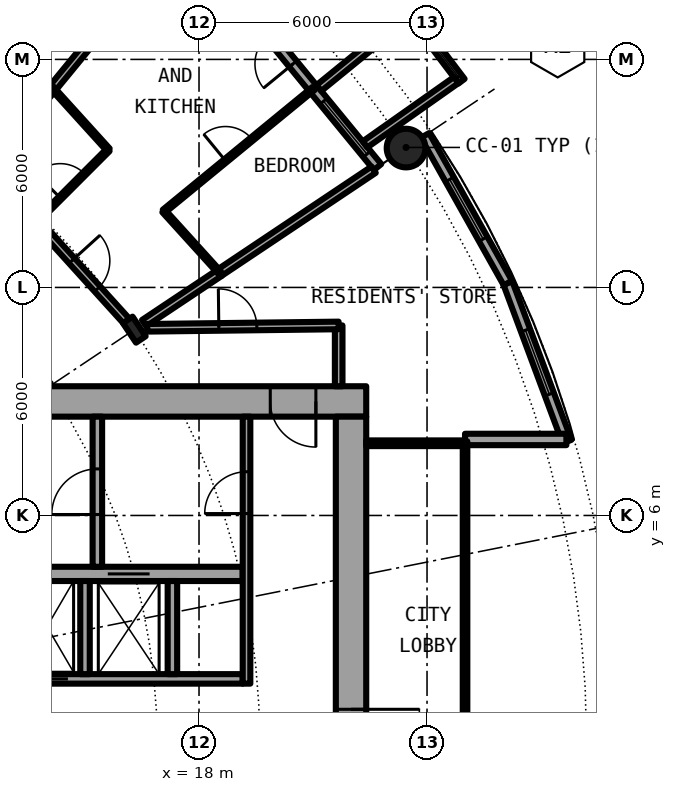
"""IFC4 building model, lengths in metres.
Left out: names, types, materials, properties, quantities, classifications, styles, units other than length and angle.
Written with IfcOpenShell. Run it as: python <this file> out.ifc"""

import sys

from ifc_helpers import new_model, si_unit, direction, frame, frame_2d, origin, origin_2d, place, context, subcontext, project, spatial, rectangle, circle, hollow_circle, i_section, extrude, element, fill, save


model = new_model("IFC4")
c1 = context("Model", 3, precision=1e-05, world=origin(), true_north=direction((0.0, 1.0)))
c2 = subcontext(c1, "Body", "Model", "MODEL_VIEW")
j1 = project(units=[si_unit("LENGTHUNIT", "METRE"), si_unit("PLANEANGLEUNIT", "RADIAN")], contexts=[c1])
p1 = place(None, origin())
s1 = spatial("IfcSite", under=j1, at=p1, CompositionType="ELEMENT")
p2 = place(p1, origin())
s2 = spatial("IfcBuilding", under=s1, at=p2, CompositionType="ELEMENT")
p3 = place(p2, frame((0.0, 0.0, 41.1)))
s3 = spatial("IfcBuildingStorey", under=s2, at=p3, CompositionType="ELEMENT", Elevation=41.1)
p4 = place(p3, frame((23.448, 15.667, 0.0), z_axis=(0.0, 0.0, 1.0), x_axis=(1.0, 0.0, 0.0)))
e1 = element("IfcColumn", 1, at=p4, inside=s3, PredefinedType="COLUMN", context=c2, shape_type="SweptSolid", body=[
    extrude(hollow_circle(Radius=0.508, WallThickness=0.05, at=origin_2d()), origin(), (0.0, 0.0, 1.0), 3.05),
])
p5 = place(p3, frame((16.297, 10.889, 0.0), z_axis=(0.0, 0.0, 1.0), x_axis=(0.831469612303, 0.55557023302, 0.0)))
e2 = element("IfcColumn", 2, at=p5, inside=s3, PredefinedType="COLUMN", context=c2, shape_type="SweptSolid", body=[
    extrude(i_section(OverallWidth=0.305, OverallDepth=0.62, WebThickness=0.021, FlangeThickness=0.04, FilletRadius=0.027, at=origin_2d()), origin(), (0.0, 0.0, 1.0), 3.05),
])
p6 = place(p3, frame((22.699, 15.167, 0.0), z_axis=(0.0, 0.0, 1.0), x_axis=(-0.634382322723, 0.773019449054, 0.0)))
e3 = element("IfcWall", 3, at=p6, inside=s3, PredefinedType="SOLIDWALL", context=c2, shape_type="SweptSolid", body=[
    extrude(rectangle(XDim=5.352, YDim=0.25, at=frame_2d((2.676, 0.0))), origin(), (0.0, 0.0, 1.0), 2.7),
])
p7 = place(p6, frame((0.441, 0.0, 0.3)))
e4 = element("IfcOpeningElement", 4, at=p7, cuts=e3, PredefinedType="OPENING", context=c2, shape_type="SweptSolid", body=[
    extrude(rectangle(XDim=1.8, YDim=2.1, at=frame_2d((0.9, 1.05))), frame((0.0, 0.135, 0.0), z_axis=(0.0, -1.0, 0.0), x_axis=(1.0, 0.0, 0.0)), (0.0, 0.0, 1.0), 0.27),
])
p8 = place(p6, frame((3.51, 0.0, 0.0)))
e5 = element("IfcOpeningElement", 5, at=p8, cuts=e3, PredefinedType="OPENING", context=c2, shape_type="SweptSolid", body=[
    extrude(rectangle(XDim=1.0, YDim=2.2, at=frame_2d((0.5, 1.1))), frame((0.0, 0.135, 0.0), z_axis=(0.0, -1.0, 0.0), x_axis=(1.0, 0.0, 0.0)), (0.0, 0.0, 1.0), 0.27),
])
p9 = place(p3, frame((24.909, 17.427, -0.03), z_axis=(0.0, 0.0, 1.0), x_axis=(-0.60418752353, 0.796842165306, 0.0)))
e6 = element("IfcWall", 6, at=p9, inside=s3, PredefinedType="SOLIDWALL", context=c2, shape_type="SweptSolid", body=[
    extrude(rectangle(XDim=2.337, YDim=0.2, at=frame_2d((1.168, 0.0))), origin(), (0.0, 0.0, 1.0), 2.73),
])
p10 = place(p9, frame((0.128, 0.0, 0.33)))
e7 = element("IfcOpeningElement", 7, at=p10, cuts=e6, PredefinedType="OPENING", context=c2, shape_type="SweptSolid", body=[
    extrude(circle(Radius=1.04, at=frame_2d((1.04, 1.04))), frame((0.0, 0.11, 0.0), z_axis=(0.0, -1.0, 0.0), x_axis=(1.0, 0.0, 0.0)), (0.0, 0.0, 1.0), 0.22),
])
p11 = place(p3, frame((22.37, 15.765, -0.03), z_axis=(0.0, 0.0, 1.0), x_axis=(0.817256123454, 0.576274612209, 0.0)))
e8 = element("IfcWall", 8, at=p11, inside=s3, PredefinedType="SOLIDWALL", context=c2, shape_type="SweptSolid", body=[
    extrude(rectangle(XDim=2.933, YDim=0.2, at=frame_2d((1.466, 0.0))), origin(), (0.0, 0.0, 1.0), 2.73),
])
p12 = place(p3, frame((21.155, 17.246, -0.03), z_axis=(0.0, 0.0, 1.0), x_axis=(0.775179004516, 0.631741648902, 0.0)))
e9 = element("IfcWall", 9, at=p12, inside=s3, PredefinedType="SOLIDWALL", context=c2, shape_type="SweptSolid", body=[
    extrude(rectangle(XDim=3.006, YDim=0.2, at=frame_2d((1.503, 0.0))), origin(), (0.0, 0.0, 1.0), 2.73),
])
p13 = place(p3, frame((27.682, 7.945, 0.0), z_axis=(0.0, 0.0, 1.0), x_axis=(-0.349247811493, 0.937030397675, 0.0)))
e10 = element("IfcWall", 10, at=p13, inside=s3, PredefinedType="SOLIDWALL", context=c2, shape_type="SweptSolid", body=[
    extrude(rectangle(XDim=4.452, YDim=0.25, at=frame_2d((2.226, 0.0))), origin(), (0.0, 0.0, 1.0), 2.7),
])
p14 = place(p13, frame((1.327, 0.0, 0.3)))
e11 = element("IfcOpeningElement", 11, at=p14, cuts=e10, PredefinedType="OPENING", context=c2, shape_type="SweptSolid", body=[
    extrude(rectangle(XDim=1.8, YDim=2.1, at=frame_2d((0.9, 1.05))), frame((0.0, 0.135, 0.0), z_axis=(0.0, -1.0, 0.0), x_axis=(1.0, 0.0, 0.0)), (0.0, 0.0, 1.0), 0.27),
])
p15 = place(p3, frame((26.127, 12.117, 0.0), z_axis=(0.0, 0.0, 1.0), x_axis=(-0.489696356642, 0.871893042919, 0.0)))
e12 = element("IfcWall", 12, at=p15, inside=s3, PredefinedType="SOLIDWALL", context=c2, shape_type="SweptSolid", body=[
    extrude(rectangle(XDim=4.454, YDim=0.25, at=frame_2d((2.227, 0.0))), origin(), (0.0, 0.0, 1.0), 2.7),
])
p16 = place(p15, frame((1.327, 0.0, 0.3)))
e13 = element("IfcOpeningElement", 13, at=p16, cuts=e12, PredefinedType="OPENING", context=c2, shape_type="SweptSolid", body=[
    extrude(rectangle(XDim=1.8, YDim=2.1, at=frame_2d((0.9, 1.05))), frame((0.0, 0.135, 0.0), z_axis=(0.0, -1.0, 0.0), x_axis=(1.0, 0.0, 0.0)), (0.0, 0.0, 1.0), 0.27),
])
p17 = place(p3, frame((25.0, 8.0, 0.0), z_axis=(0.0, 0.0, 1.0), x_axis=(1.0, 0.0, 0.0)))
e14 = element("IfcWall", 14, at=p17, inside=s3, PredefinedType="SOLIDWALL", context=c2, shape_type="SweptSolid", body=[
    extrude(rectangle(XDim=2.667, YDim=0.3, at=frame_2d((1.333, 0.0))), origin(), (0.0, 0.0, 1.0), 2.7),
])
p18 = place(p3, frame((22.4, 9.0, 0.0), z_axis=(0.0, 0.0, 1.0), x_axis=(-1.0, 0.0, 0.0)))
e15 = element("IfcWall", 15, at=p18, inside=s3, PredefinedType="SHEAR", context=c2, shape_type="SweptSolid", body=[
    extrude(rectangle(XDim=14.2, YDim=0.8, at=frame_2d((7.1, 0.0))), origin(), (0.0, 0.0, 1.0), 3.05),
])
p19 = place(p18, frame((1.325, 0.0, 0.0)))
e16 = element("IfcOpeningElement", 16, at=p19, cuts=e15, PredefinedType="OPENING", context=c2, shape_type="SweptSolid", body=[
    extrude(rectangle(XDim=1.2, YDim=2.3, at=frame_2d((0.6, 1.15))), frame((0.0, 0.41, 0.0), z_axis=(0.0, -1.0, 0.0), x_axis=(1.0, 0.0, 0.0)), (0.0, 0.0, 1.0), 0.82),
])
p20 = place(p3, frame((22.0, 8.6, 0.0), z_axis=(0.0, 0.0, 1.0), x_axis=(0.0, -1.0, 0.0)))
e17 = element("IfcWall", 17, at=p20, inside=s3, PredefinedType="SHEAR", context=c2, shape_type="SweptSolid", body=[
    extrude(rectangle(XDim=17.2, YDim=0.8, at=frame_2d((8.6, 0.0))), origin(), (0.0, 0.0, 1.0), 3.05),
])
p21 = place(p20, frame((7.7, 0.0, 0.0)))
e18 = element("IfcOpeningElement", 18, at=p21, cuts=e17, PredefinedType="OPENING", context=c2, shape_type="SweptSolid", body=[
    extrude(rectangle(XDim=1.8, YDim=2.3, at=frame_2d((0.9, 1.15))), frame((0.0, 0.41, 0.0), z_axis=(0.0, -1.0, 0.0), x_axis=(1.0, 0.0, 0.0)), (0.0, 0.0, 1.0), 0.82),
])
p22 = place(p3, frame((9.0, 1.7, 0.0), z_axis=(0.0, 0.0, 1.0), x_axis=(1.0, 0.0, 0.0)))
e19 = element("IfcWall", 19, at=p22, inside=s3, PredefinedType="SHEAR", context=c2, shape_type="SweptSolid", body=[
    extrude(rectangle(XDim=10.15, YDim=0.25, at=frame_2d((5.075, 0.0))), origin(), (0.0, 0.0, 1.0), 3.05),
])
p23 = place(p22, frame((0.387, 0.0, 0.0)))
e20 = element("IfcOpeningElement", 20, at=p23, cuts=e19, PredefinedType="OPENING", context=c2, shape_type="SweptSolid", body=[
    extrude(rectangle(XDim=1.1, YDim=2.3, at=frame_2d((0.55, 1.15))), frame((0.0, 0.135, 0.0), z_axis=(0.0, -1.0, 0.0), x_axis=(1.0, 0.0, 0.0)), (0.0, 0.0, 1.0), 0.27),
])
p24 = place(p22, frame((2.45, 0.0, 0.0)))
e21 = element("IfcOpeningElement", 21, at=p24, cuts=e19, PredefinedType="OPENING", context=c2, shape_type="SweptSolid", body=[
    extrude(rectangle(XDim=1.1, YDim=2.3, at=frame_2d((0.55, 1.15))), frame((0.0, 0.135, 0.0), z_axis=(0.0, -1.0, 0.0), x_axis=(1.0, 0.0, 0.0)), (0.0, 0.0, 1.0), 0.27),
])
p25 = place(p22, frame((4.45, 0.0, 0.0)))
e22 = element("IfcOpeningElement", 22, at=p25, cuts=e19, PredefinedType="OPENING", context=c2, shape_type="SweptSolid", body=[
    extrude(rectangle(XDim=1.1, YDim=2.3, at=frame_2d((0.55, 1.15))), frame((0.0, 0.135, 0.0), z_axis=(0.0, -1.0, 0.0), x_axis=(1.0, 0.0, 0.0)), (0.0, 0.0, 1.0), 0.27),
])
p26 = place(p3, frame((9.0, 4.462, 0.0), z_axis=(0.0, 0.0, 1.0), x_axis=(1.0, 0.0, 0.0)))
e23 = element("IfcWall", 23, at=p26, inside=s3, PredefinedType="SHEAR", context=c2, shape_type="SweptSolid", body=[
    extrude(rectangle(XDim=10.15, YDim=0.375, at=frame_2d((5.075, 0.0))), origin(), (0.0, 0.0, 1.0), 3.05),
])
p27 = place(p26, frame((6.6, 0.0, 0.0)))
e24 = element("IfcOpeningElement", 24, at=p27, cuts=e23, PredefinedType="OPENING", context=c2, shape_type="SweptSolid", body=[
    extrude(rectangle(XDim=1.1, YDim=2.3, at=frame_2d((0.55, 1.15))), frame((0.0, 0.198, 0.0), z_axis=(0.0, -1.0, 0.0), x_axis=(1.0, 0.0, 0.0)), (0.0, 0.0, 1.0), 0.395),
])
p28 = place(p3, frame((15.325, 4.65, 0.0), z_axis=(0.0, 0.0, 1.0), x_axis=(0.0, 1.0, 0.0)))
e25 = element("IfcWall", 25, at=p28, inside=s3, PredefinedType="SHEAR", context=c2, shape_type="SweptSolid", body=[
    extrude(rectangle(XDim=3.95, YDim=0.25, at=frame_2d((1.975, 0.0))), origin(), (0.0, 0.0, 1.0), 3.05),
])
p29 = place(p28, frame((1.375, 0.0, 0.0)))
e26 = element("IfcOpeningElement", 26, at=p29, cuts=e25, PredefinedType="OPENING", context=c2, shape_type="SweptSolid", body=[
    extrude(rectangle(XDim=1.2, YDim=2.3, at=frame_2d((0.6, 1.15))), frame((0.0, 0.135, 0.0), z_axis=(0.0, -1.0, 0.0), x_axis=(1.0, 0.0, 0.0)), (0.0, 0.0, 1.0), 0.27),
])
for number, where, z_axis, x_axis in (
    (27, (15.0, 1.825, 0.0), (0.0, 0.0, 1.0), (0.0, 1.0, 0.0)),
    (28, (17.3, 1.825, 0.0), (0.0, 0.0, 1.0), (0.0, 1.0, 0.0)),
):
    element("IfcWall", number, at=place(p3, frame(where, z_axis=z_axis, x_axis=x_axis)), inside=s3, PredefinedType="SOLIDWALL", context=c2, shape_type="SweptSolid", body=[
        extrude(rectangle(XDim=2.45, YDim=0.25, at=frame_2d((1.225, 0.0))), origin(), (0.0, 0.0, 1.0), 2.7),
    ])
p30 = place(p3, frame((19.25, 1.575, 0.0), z_axis=(0.0, 0.0, 1.0), x_axis=(0.0, 1.0, 0.0)))
e29 = element("IfcWall", 29, at=p30, inside=s3, PredefinedType="SOLIDWALL", context=c2, shape_type="SweptSolid", body=[
    extrude(rectangle(XDim=7.025, YDim=0.2, at=frame_2d((3.513, 0.0))), origin(), (0.0, 0.0, 1.0), 2.7),
])
p31 = place(p30, frame((4.475, 0.0, 0.0)))
e30 = element("IfcOpeningElement", 30, at=p31, cuts=e29, PredefinedType="OPENING", context=c2, shape_type="SweptSolid", body=[
    extrude(rectangle(XDim=1.1, YDim=2.3, at=frame_2d((0.55, 1.15))), frame((0.0, 0.11, 0.0), z_axis=(0.0, -1.0, 0.0), x_axis=(1.0, 0.0, 0.0)), (0.0, 0.0, 1.0), 0.22),
])
p32 = place(p3, frame((22.4, 7.9, 0.0), z_axis=(0.0, 0.0, 1.0), x_axis=(1.0, 0.0, 0.0)))
e31 = element("IfcWall", 31, at=p32, inside=s3, PredefinedType="PARTITIONING", context=c2, shape_type="SweptSolid", body=[
    extrude(rectangle(XDim=2.54, YDim=0.15, at=frame_2d((1.27, 0.0))), origin(), (0.0, 0.0, 1.0), 2.7),
])
p33 = place(p3, frame((25.0, -7.95, 0.0), z_axis=(0.0, 0.0, 1.0), x_axis=(0.0, 1.0, 0.0)))
e32 = element("IfcWall", 32, at=p33, inside=s3, PredefinedType="PARTITIONING", context=c2, shape_type="SweptSolid", body=[
    extrude(rectangle(XDim=15.9, YDim=0.12, at=frame_2d((7.95, 0.0))), origin(), (0.0, 0.0, 1.0), 2.7),
])
p34 = place(p33, frame((0.95, 0.0, 0.1)))
e33 = element("IfcOpeningElement", 33, at=p34, cuts=e32, PredefinedType="OPENING", context=c2, shape_type="SweptSolid", body=[
    extrude(rectangle(XDim=14.0, YDim=2.35, at=frame_2d((7.0, 1.175))), frame((0.0, 0.07, 0.0), z_axis=(0.0, -1.0, 0.0), x_axis=(1.0, 0.0, 0.0)), (0.0, 0.0, 1.0), 0.14),
])
p35 = place(p3, frame((21.675, 9.4, 0.0), z_axis=(0.0, 0.0, 1.0), x_axis=(0.0, 1.0, 0.0)))
e34 = element("IfcWall", 34, at=p35, inside=s3, PredefinedType="PARTITIONING", context=c2, shape_type="SweptSolid", body=[
    extrude(rectangle(XDim=1.6, YDim=0.2, at=frame_2d((0.8, 0.0))), origin(), (0.0, 0.0, 1.0), 2.7),
])
p36 = place(p3, frame((12.432, 15.152, 0.0), z_axis=(0.0, 0.0, 1.0), x_axis=(0.634353152115, 0.77304338714, 0.0)))
e35 = element("IfcWall", 35, at=p36, inside=s3, PredefinedType="PARTITIONING", context=c2, shape_type="SweptSolid", body=[
    extrude(rectangle(XDim=7.576, YDim=0.2, at=frame_2d((3.788, 0.0))), origin(), (0.0, 0.0, 1.0), 2.7),
])
p37 = place(p3, frame((13.722, 13.73, 0.0), z_axis=(0.0, 0.0, 1.0), x_axis=(0.706741540154, 0.707471833659, 0.0)))
e36 = element("IfcWall", 36, at=p37, inside=s3, PredefinedType="PARTITIONING", context=c2, shape_type="SweptSolid", body=[
    extrude(rectangle(XDim=2.674, YDim=0.1, at=frame_2d((1.337, 0.0))), origin(), (0.0, 0.0, 1.0), 2.7),
])
p38 = place(p37, frame((0.887, 0.0, 0.0)))
e37 = element("IfcOpeningElement", 37, at=p38, cuts=e36, PredefinedType="OPENING", context=c2, shape_type="SweptSolid", body=[
    extrude(rectangle(XDim=0.9, YDim=2.3, at=frame_2d((0.45, 1.15))), frame((0.0, 0.06, 0.0), z_axis=(0.0, -1.0, 0.0), x_axis=(1.0, 0.0, 0.0)), (0.0, 0.0, 1.0), 0.12),
])
p39 = place(p3, frame((17.077, 14.006, 0.0), z_axis=(0.0, 0.0, 1.0), x_axis=(0.77326214499, 0.634086472908, 0.0)))
e38 = element("IfcWall", 38, at=p39, inside=s3, PredefinedType="PARTITIONING", context=c2, shape_type="SweptSolid", body=[
    extrude(rectangle(XDim=5.089, YDim=0.1, at=frame_2d((2.544, 0.0))), origin(), (0.0, 0.0, 1.0), 2.7),
])
p40 = place(p39, frame((2.094, 0.0, 0.0)))
e39 = element("IfcOpeningElement", 39, at=p40, cuts=e38, PredefinedType="OPENING", context=c2, shape_type="SweptSolid", body=[
    extrude(rectangle(XDim=0.9, YDim=2.3, at=frame_2d((0.45, 1.15))), frame((0.0, 0.06, 0.0), z_axis=(0.0, -1.0, 0.0), x_axis=(1.0, 0.0, 0.0)), (0.0, 0.0, 1.0), 0.12),
])
p41 = place(p3, frame((18.542, 12.389, 0.0), z_axis=(0.0, 0.0, 1.0), x_axis=(0.831387096605, 0.55569370664, 0.0)))
e40 = element("IfcWall", 40, at=p41, inside=s3, PredefinedType="PARTITIONING", context=c2, shape_type="SweptSolid", body=[
    extrude(rectangle(XDim=4.875, YDim=0.2, at=frame_2d((2.438, 0.0))), origin(), (0.0, 0.0, 1.0), 2.7),
])
p42 = place(p3, frame((16.555, 11.061, 0.0), z_axis=(0.0, 0.0, 1.0), x_axis=(0.832066006555, 0.554676627176, 0.0)))
e41 = element("IfcWall", 41, at=p42, inside=s3, PredefinedType="PARTITIONING", context=c2, shape_type="SweptSolid", body=[
    extrude(rectangle(XDim=2.39, YDim=0.2, at=frame_2d((1.195, 0.0))), origin(), (0.0, 0.0, 1.0), 2.7),
])
p43 = place(p3, frame((16.637, 10.938, 0.0), z_axis=(0.0, 0.0, 1.0), x_axis=(0.99992425795, 0.012307654658, 0.0)))
e42 = element("IfcWall", 42, at=p43, inside=s3, PredefinedType="PARTITIONING", context=c2, shape_type="SweptSolid", body=[
    extrude(rectangle(XDim=5.039, YDim=0.2, at=frame_2d((2.519, 0.0))), origin(), (0.0, 0.0, 1.0), 2.7),
])
p44 = place(p43, frame((1.884, 0.0, 0.0)))
e43 = element("IfcOpeningElement", 43, at=p44, cuts=e42, PredefinedType="OPENING", context=c2, shape_type="SweptSolid", body=[
    extrude(rectangle(XDim=1.0, YDim=2.3, at=frame_2d((0.5, 1.15))), frame((0.0, 0.11, 0.0), z_axis=(0.0, -1.0, 0.0), x_axis=(1.0, 0.0, 0.0)), (0.0, 0.0, 1.0), 0.22),
])
p45 = place(p3, frame((12.434, 15.151, 0.0), z_axis=(0.0, 0.0, 1.0), x_axis=(0.671514934772, -0.740991020444, 0.0)))
e44 = element("IfcWall", 44, at=p45, inside=s3, PredefinedType="PARTITIONING", context=c2, shape_type="SweptSolid", body=[
    extrude(rectangle(XDim=5.598, YDim=0.2, at=frame_2d((2.799, 0.0))), origin(), (0.0, 0.0, 1.0), 2.38),
])
p46 = place(p45, frame((3.305, 0.0, 0.0)))
e45 = element("IfcOpeningElement", 45, at=p46, cuts=e44, PredefinedType="OPENING", context=c2, shape_type="SweptSolid", body=[
    extrude(rectangle(XDim=1.0, YDim=2.3, at=frame_2d((0.5, 1.15))), frame((0.0, 0.11, 0.0), z_axis=(0.0, -1.0, 0.0), x_axis=(1.0, 0.0, 0.0)), (0.0, 0.0, 1.0), 0.22),
])
p47 = place(p3, frame((10.222, 19.094, 0.0), z_axis=(0.0, 0.0, 1.0), x_axis=(0.904171929575, -0.427168727518, 0.0)))
e46 = element("IfcWall", 46, at=p47, inside=s3, PredefinedType="PARTITIONING", context=c2, shape_type="SweptSolid", body=[
    extrude(rectangle(XDim=4.336, YDim=0.1, at=frame_2d((2.168, 0.0))), origin(), (0.0, 0.0, 1.0), 2.7),
])
p48 = place(p47, frame((2.808, 0.0, 0.0)))
e47 = element("IfcOpeningElement", 47, at=p48, cuts=e46, PredefinedType="OPENING", context=c2, shape_type="SweptSolid", body=[
    extrude(rectangle(XDim=0.9, YDim=2.3, at=frame_2d((0.45, 1.15))), frame((0.0, 0.06, 0.0), z_axis=(0.0, -1.0, 0.0), x_axis=(1.0, 0.0, 0.0)), (0.0, 0.0, 1.0), 0.12),
])
p49 = place(p3, frame((14.147, 17.238, 0.0), z_axis=(0.0, 0.0, 1.0), x_axis=(0.671674967707, -0.740845960882, 0.0)))
e48 = element("IfcWall", 48, at=p49, inside=s3, PredefinedType="PARTITIONING", context=c2, shape_type="SweptSolid", body=[
    extrude(rectangle(XDim=2.181, YDim=0.1, at=frame_2d((1.091, 0.0))), origin(), (0.0, 0.0, 1.0), 2.7),
])
p50 = place(p3, frame((17.072, 14.011, 0.0), z_axis=(0.0, 0.0, 1.0), x_axis=(0.67169789574, -0.740825172937, 0.0)))
e49 = element("IfcWall", 49, at=p50, inside=s3, PredefinedType="PARTITIONING", context=c2, shape_type="SweptSolid", body=[
    extrude(rectangle(XDim=2.183, YDim=0.1, at=frame_2d((1.091, 0.0))), origin(), (0.0, 0.0, 1.0), 2.7),
])
p51 = place(p7, origin())
e50 = element("IfcWindow", 50, at=p51, inside=s3, PartitioningType="SINGLE_PANEL", PredefinedType="WINDOW", context=c2, shape_type="SweptSolid", body=[
    extrude(rectangle(XDim=1.8, YDim=2.1, at=frame_2d((0.9, 1.05))), frame((0.0, 0.03, 0.0), z_axis=(0.0, -1.0, 0.0), x_axis=(1.0, 0.0, 0.0)), (0.0, 0.0, 1.0), 0.06),
])
fill(e4, e50)
p52 = place(p10, origin())
e51 = element("IfcWindow", 51, at=p52, inside=s3, PartitioningType="SINGLE_PANEL", PredefinedType="WINDOW", context=c2, shape_type="SweptSolid", body=[
    extrude(circle(Radius=1.04, at=frame_2d((1.04, 1.04))), frame((0.0, 0.03, 0.0), z_axis=(0.0, -1.0, 0.0), x_axis=(1.0, 0.0, 0.0)), (0.0, 0.0, 1.0), 0.06),
])
fill(e7, e51)
p53 = place(p8, origin())
e52 = element("IfcDoor", 52, at=p53, inside=s3, OperationType="SINGLE_SWING_LEFT", PredefinedType="DOOR", context=c2, shape_type="SweptSolid", body=[
    extrude(rectangle(XDim=1.0, YDim=2.2, at=frame_2d((0.5, 1.1))), frame((0.0, 0.025, 0.0), z_axis=(0.0, -1.0, 0.0), x_axis=(1.0, 0.0, 0.0)), (0.0, 0.0, 1.0), 0.05),
])
fill(e5, e52)
p54 = place(p14, origin())
e53 = element("IfcWindow", 53, at=p54, inside=s3, PartitioningType="SINGLE_PANEL", PredefinedType="WINDOW", context=c2, shape_type="SweptSolid", body=[
    extrude(rectangle(XDim=1.8, YDim=2.1, at=frame_2d((0.9, 1.05))), frame((0.0, 0.03, 0.0), z_axis=(0.0, -1.0, 0.0), x_axis=(1.0, 0.0, 0.0)), (0.0, 0.0, 1.0), 0.06),
])
fill(e11, e53)
p55 = place(p16, origin())
e54 = element("IfcWindow", 54, at=p55, inside=s3, PartitioningType="SINGLE_PANEL", PredefinedType="WINDOW", context=c2, shape_type="SweptSolid", body=[
    extrude(rectangle(XDim=1.8, YDim=2.1, at=frame_2d((0.9, 1.05))), frame((0.0, 0.03, 0.0), z_axis=(0.0, -1.0, 0.0), x_axis=(1.0, 0.0, 0.0)), (0.0, 0.0, 1.0), 0.06),
])
fill(e13, e54)
p56 = place(p25, origin())
e55 = element("IfcDoor", 55, at=p56, inside=s3, OperationType="DOUBLE_DOOR_SLIDING", PredefinedType="DOOR", context=c2, shape_type="SweptSolid", body=[
    extrude(rectangle(XDim=1.1, YDim=2.3, at=frame_2d((0.55, 1.15))), frame((0.0, 0.025, 0.0), z_axis=(0.0, -1.0, 0.0), x_axis=(1.0, 0.0, 0.0)), (0.0, 0.0, 1.0), 0.05),
])
fill(e22, e55)
p57 = place(p27, origin())
e56 = element("IfcDoor", 56, at=p57, inside=s3, OperationType="DOUBLE_DOOR_SLIDING", PredefinedType="DOOR", context=c2, shape_type="SweptSolid", body=[
    extrude(rectangle(XDim=1.1, YDim=2.3, at=frame_2d((0.55, 1.15))), frame((0.0, 0.025, 0.0), z_axis=(0.0, -1.0, 0.0), x_axis=(1.0, 0.0, 0.0)), (0.0, 0.0, 1.0), 0.05),
])
fill(e24, e56)
p58 = place(p29, origin())
e57 = element("IfcDoor", 57, at=p58, inside=s3, OperationType="SINGLE_SWING_LEFT", PredefinedType="DOOR", context=c2, shape_type="SweptSolid", body=[
    extrude(rectangle(XDim=1.2, YDim=2.3, at=frame_2d((0.6, 1.15))), frame((0.0, 0.025, 0.0), z_axis=(0.0, -1.0, 0.0), x_axis=(1.0, 0.0, 0.0)), (0.0, 0.0, 1.0), 0.05),
])
fill(e26, e57)
p59 = place(p31, origin())
e58 = element("IfcDoor", 58, at=p59, inside=s3, OperationType="SINGLE_SWING_LEFT", PredefinedType="DOOR", context=c2, shape_type="SweptSolid", body=[
    extrude(rectangle(XDim=1.1, YDim=2.3, at=frame_2d((0.55, 1.15))), frame((0.0, 0.025, 0.0), z_axis=(0.0, -1.0, 0.0), x_axis=(1.0, 0.0, 0.0)), (0.0, 0.0, 1.0), 0.05),
])
fill(e30, e58)
p60 = place(p19, origin())
e59 = element("IfcDoor", 59, at=p60, inside=s3, OperationType="SINGLE_SWING_RIGHT", PredefinedType="DOOR", context=c2, shape_type="SweptSolid", body=[
    extrude(rectangle(XDim=1.2, YDim=2.3, at=frame_2d((0.6, 1.15))), frame((0.0, 0.025, 0.0), z_axis=(0.0, -1.0, 0.0), x_axis=(1.0, 0.0, 0.0)), (0.0, 0.0, 1.0), 0.05),
])
fill(e16, e59)
p61 = place(p21, origin())
e60 = element("IfcDoor", 60, at=p61, inside=s3, OperationType="SINGLE_SWING_LEFT", PredefinedType="DOOR", context=c2, shape_type="SweptSolid", body=[
    extrude(rectangle(XDim=1.8, YDim=2.3, at=frame_2d((0.9, 1.15))), frame((0.0, 0.025, 0.0), z_axis=(0.0, -1.0, 0.0), x_axis=(1.0, 0.0, 0.0)), (0.0, 0.0, 1.0), 0.05),
])
fill(e18, e60)
p62 = place(p34, origin())
e61 = element("IfcWindow", 61, at=p62, inside=s3, PartitioningType="SINGLE_PANEL", PredefinedType="WINDOW", context=c2, shape_type="SweptSolid", body=[
    extrude(rectangle(XDim=14.0, YDim=2.35, at=frame_2d((7.0, 1.175))), frame((0.0, 0.03, 0.0), z_axis=(0.0, -1.0, 0.0), x_axis=(1.0, 0.0, 0.0)), (0.0, 0.0, 1.0), 0.06),
])
fill(e33, e61)
p63 = place(p46, origin())
e62 = element("IfcDoor", 62, at=p63, inside=s3, OperationType="SINGLE_SWING_RIGHT", PredefinedType="DOOR", context=c2, shape_type="SweptSolid", body=[
    extrude(rectangle(XDim=1.0, YDim=2.3, at=frame_2d((0.5, 1.15))), frame((0.0, 0.025, 0.0), z_axis=(0.0, -1.0, 0.0), x_axis=(1.0, 0.0, 0.0)), (0.0, 0.0, 1.0), 0.05),
])
fill(e45, e62)
p64 = place(p38, origin())
e63 = element("IfcDoor", 63, at=p64, inside=s3, OperationType="SINGLE_SWING_RIGHT", PredefinedType="DOOR", context=c2, shape_type="SweptSolid", body=[
    extrude(rectangle(XDim=0.9, YDim=2.3, at=frame_2d((0.45, 1.15))), frame((0.0, 0.025, 0.0), z_axis=(0.0, -1.0, 0.0), x_axis=(1.0, 0.0, 0.0)), (0.0, 0.0, 1.0), 0.05),
])
fill(e37, e63)
p65 = place(p40, origin())
e64 = element("IfcDoor", 64, at=p65, inside=s3, OperationType="SINGLE_SWING_RIGHT", PredefinedType="DOOR", context=c2, shape_type="SweptSolid", body=[
    extrude(rectangle(XDim=0.9, YDim=2.3, at=frame_2d((0.45, 1.15))), frame((0.0, 0.025, 0.0), z_axis=(0.0, -1.0, 0.0), x_axis=(1.0, 0.0, 0.0)), (0.0, 0.0, 1.0), 0.05),
])
fill(e39, e64)
p66 = place(p44, origin())
e65 = element("IfcDoor", 65, at=p66, inside=s3, OperationType="SINGLE_SWING_LEFT", PredefinedType="DOOR", context=c2, shape_type="SweptSolid", body=[
    extrude(rectangle(XDim=1.0, YDim=2.3, at=frame_2d((0.5, 1.15))), frame((0.0, 0.025, 0.0), z_axis=(0.0, -1.0, 0.0), x_axis=(1.0, 0.0, 0.0)), (0.0, 0.0, 1.0), 0.05),
])
fill(e43, e65)
save(model, sys.argv[1])
